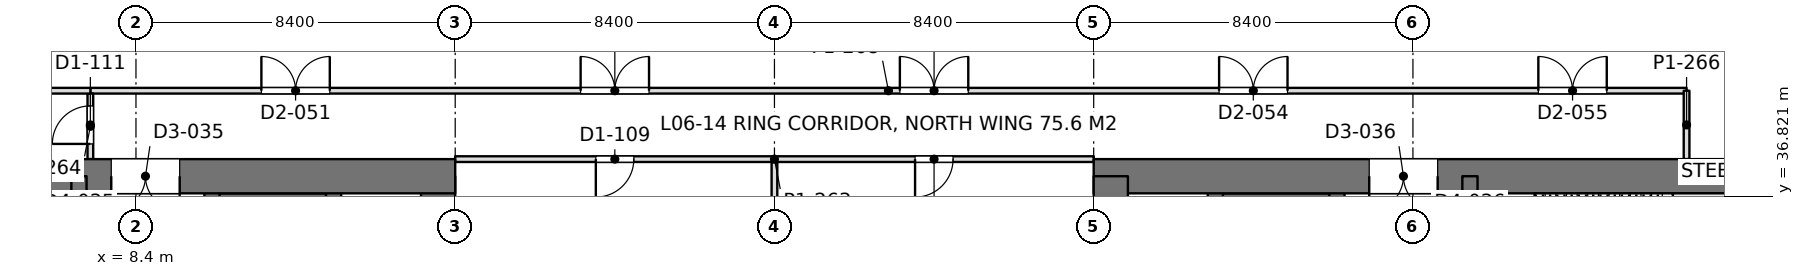
"""IFC4 building model, lengths in metres.
Left out: names, types, materials, properties, quantities, classifications, styles, units other than length and angle.
Written with IfcOpenShell. Run it as: python <this file> out.ifc"""

import sys

from ifc_helpers import new_model, si_unit, direction, frame, frame_2d, origin, place, context, subcontext, project, spatial, rectangle, extrude, element, fill, save


model = new_model("IFC4")
c1 = context("Model", 3, precision=1e-05, world=origin(), true_north=direction((0.0, 1.0)))
c2 = subcontext(c1, "Body", "Model", "MODEL_VIEW")
j1 = project(units=[si_unit("LENGTHUNIT", "METRE"), si_unit("PLANEANGLEUNIT", "RADIAN")], contexts=[c1])
p1 = place(None, origin())
s1 = spatial("IfcSite", under=j1, at=p1, CompositionType="ELEMENT")
p2 = place(p1, origin())
s2 = spatial("IfcBuilding", under=s1, at=p2, CompositionType="ELEMENT")
p3 = place(p2, frame((0.0, 0.0, 27.9)))
s3 = spatial("IfcBuildingStorey", under=s2, at=p3, CompositionType="ELEMENT", Elevation=27.9)
p4 = place(p3, frame((-1.2, 37.35, 0.0), z_axis=(0.0, 0.0, 1.0), x_axis=(1.0, 0.0, 0.0)))
e1 = element("IfcWall", 1, at=p4, inside=s3, PredefinedType="SHEAR", context=c2, shape_type="SweptSolid", body=[
    extrude(rectangle(XDim=18.0, YDim=0.9, at=frame_2d((9.0, 0.0))), origin(), (0.0, 0.0, 1.0), 4.5),
])
p5 = place(p4, frame((8.95, 0.0, 0.0)))
e2 = element("IfcOpeningElement", 2, at=p5, cuts=e1, PredefinedType="OPENING", context=c2, shape_type="SweptSolid", body=[
    extrude(rectangle(XDim=1.8, YDim=2.4, at=frame_2d((0.9, 1.2))), frame((0.0, 0.46, 0.0), z_axis=(0.0, -1.0, 0.0), x_axis=(1.0, 0.0, 0.0)), (0.0, 0.0, 1.0), 0.92),
])
p6 = place(p3, frame((16.35, 13.05, 0.0), z_axis=(0.0, 0.0, 1.0), x_axis=(0.0, 1.0, 0.0)))
e3 = element("IfcWall", 3, at=p6, inside=s3, PredefinedType="SHEAR", context=c2, shape_type="SweptSolid", body=[
    extrude(rectangle(XDim=24.3, YDim=0.9, at=frame_2d((12.15, 0.0))), origin(), (0.0, 0.0, 1.0), 4.5),
])
p7 = place(p3, frame((6.9, 13.05, 0.0), z_axis=(0.0, 0.0, 1.0), x_axis=(0.0, 1.0, 0.0)))
e4 = element("IfcWall", 4, at=p7, inside=s3, PredefinedType="SHEAR", context=c2, shape_type="SweptSolid", body=[
    extrude(rectangle(XDim=24.3, YDim=0.4, at=frame_2d((12.15, 0.0))), origin(), (0.0, 0.0, 1.0), 4.5),
])
p8 = place(p7, frame((1.3, 0.0, 0.0)))
e5 = element("IfcOpeningElement", 5, at=p8, cuts=e4, PredefinedType="OPENING", context=c2, shape_type="SweptSolid", body=[
    extrude(rectangle(XDim=1.0, YDim=2.2, at=frame_2d((0.5, 1.1))), frame((0.0, 0.21, 0.0), z_axis=(0.0, -1.0, 0.0), x_axis=(1.0, 0.0, 0.0)), (0.0, 0.0, 1.0), 0.42),
])
p9 = place(p7, frame((22.0, 0.0, 0.0)))
e6 = element("IfcOpeningElement", 6, at=p9, cuts=e4, PredefinedType="OPENING", context=c2, shape_type="SweptSolid", body=[
    extrude(rectangle(XDim=1.0, YDim=2.2, at=frame_2d((0.5, 1.1))), frame((0.0, 0.21, 0.0), z_axis=(0.0, -1.0, 0.0), x_axis=(1.0, 0.0, 0.0)), (0.0, 0.0, 1.0), 0.42),
])
p10 = place(p7, frame((5.55, 0.0, 0.0)))
e7 = element("IfcOpeningElement", 7, at=p10, cuts=e4, PredefinedType="OPENING", context=c2, shape_type="SweptSolid", body=[
    extrude(rectangle(XDim=1.0, YDim=2.2, at=frame_2d((0.5, 1.1))), frame((0.0, 0.21, 0.0), z_axis=(0.0, -1.0, 0.0), x_axis=(1.0, 0.0, 0.0)), (0.0, 0.0, 1.0), 0.42),
])
p11 = place(p7, frame((9.55, 0.0, 0.0)))
e8 = element("IfcOpeningElement", 8, at=p11, cuts=e4, PredefinedType="OPENING", context=c2, shape_type="SweptSolid", body=[
    extrude(rectangle(XDim=1.0, YDim=2.2, at=frame_2d((0.5, 1.1))), frame((0.0, 0.21, 0.0), z_axis=(0.0, -1.0, 0.0), x_axis=(1.0, 0.0, 0.0)), (0.0, 0.0, 1.0), 0.42),
])
p12 = place(p7, frame((12.8, 0.0, 0.0)))
e9 = element("IfcOpeningElement", 9, at=p12, cuts=e4, PredefinedType="OPENING", context=c2, shape_type="SweptSolid", body=[
    extrude(rectangle(XDim=1.1, YDim=2.2, at=frame_2d((0.55, 1.1))), frame((0.0, 0.21, 0.0), z_axis=(0.0, -1.0, 0.0), x_axis=(1.0, 0.0, 0.0)), (0.0, 0.0, 1.0), 0.42),
])
p13 = place(p7, frame((15.538, 0.0, 0.0)))
e10 = element("IfcOpeningElement", 10, at=p13, cuts=e4, PredefinedType="OPENING", context=c2, shape_type="SweptSolid", body=[
    extrude(rectangle(XDim=1.1, YDim=2.2, at=frame_2d((0.55, 1.1))), frame((0.0, 0.21, 0.0), z_axis=(0.0, -1.0, 0.0), x_axis=(1.0, 0.0, 0.0)), (0.0, 0.0, 1.0), 0.42),
])
p14 = place(p7, frame((18.262, 0.0, 0.0)))
e11 = element("IfcOpeningElement", 11, at=p14, cuts=e4, PredefinedType="OPENING", context=c2, shape_type="SweptSolid", body=[
    extrude(rectangle(XDim=1.1, YDim=2.2, at=frame_2d((0.55, 1.1))), frame((0.0, 0.21, 0.0), z_axis=(0.0, -1.0, 0.0), x_axis=(1.0, 0.0, 0.0)), (0.0, 0.0, 1.0), 0.42),
])
p15 = place(p3, frame((10.4, 13.05, 0.0), z_axis=(0.0, 0.0, 1.0), x_axis=(0.0, 1.0, 0.0)))
e12 = element("IfcWall", 12, at=p15, inside=s3, PredefinedType="SHEAR", context=c2, shape_type="SweptSolid", body=[
    extrude(rectangle(XDim=24.3, YDim=0.4, at=frame_2d((12.15, 0.0))), origin(), (0.0, 0.0, 1.0), 4.5),
])
p16 = place(p15, frame((1.5, 0.0, 0.0)))
e13 = element("IfcOpeningElement", 13, at=p16, cuts=e12, PredefinedType="OPENING", context=c2, shape_type="SweptSolid", body=[
    extrude(rectangle(XDim=1.1, YDim=2.2, at=frame_2d((0.55, 1.1))), frame((0.0, 0.21, 0.0), z_axis=(0.0, -1.0, 0.0), x_axis=(1.0, 0.0, 0.0)), (0.0, 0.0, 1.0), 0.42),
])
p17 = place(p15, frame((4.35, 0.0, 0.0)))
e14 = element("IfcOpeningElement", 14, at=p17, cuts=e12, PredefinedType="OPENING", context=c2, shape_type="SweptSolid", body=[
    extrude(rectangle(XDim=1.1, YDim=2.2, at=frame_2d((0.55, 1.1))), frame((0.0, 0.21, 0.0), z_axis=(0.0, -1.0, 0.0), x_axis=(1.0, 0.0, 0.0)), (0.0, 0.0, 1.0), 0.42),
])
p18 = place(p15, frame((7.2, 0.0, 0.0)))
e15 = element("IfcOpeningElement", 15, at=p18, cuts=e12, PredefinedType="OPENING", context=c2, shape_type="SweptSolid", body=[
    extrude(rectangle(XDim=1.1, YDim=2.2, at=frame_2d((0.55, 1.1))), frame((0.0, 0.21, 0.0), z_axis=(0.0, -1.0, 0.0), x_axis=(1.0, 0.0, 0.0)), (0.0, 0.0, 1.0), 0.42),
])
p19 = place(p15, frame((21.45, 0.0, 0.0)))
e16 = element("IfcOpeningElement", 16, at=p19, cuts=e12, PredefinedType="OPENING", context=c2, shape_type="SweptSolid", body=[
    extrude(rectangle(XDim=1.1, YDim=2.2, at=frame_2d((0.55, 1.1))), frame((0.0, 0.21, 0.0), z_axis=(0.0, -1.0, 0.0), x_axis=(1.0, 0.0, 0.0)), (0.0, 0.0, 1.0), 0.42),
])
p20 = place(p3, frame((13.6, 13.05, 0.0), z_axis=(0.0, 0.0, 1.0), x_axis=(0.0, 1.0, 0.0)))
e17 = element("IfcWall", 17, at=p20, inside=s3, PredefinedType="SHEAR", context=c2, shape_type="SweptSolid", body=[
    extrude(rectangle(XDim=24.3, YDim=0.4, at=frame_2d((12.15, 0.0))), origin(), (0.0, 0.0, 1.0), 4.5),
])
p21 = place(p3, frame((10.4, 36.625, 0.0), z_axis=(0.0, 0.0, 1.0), x_axis=(1.0, 0.0, 0.0)))
e18 = element("IfcWall", 18, at=p21, inside=s3, PredefinedType="SHEAR", context=c2, shape_type="SweptSolid", body=[
    extrude(rectangle(XDim=3.2, YDim=0.55, at=frame_2d((1.6, 0.0))), origin(), (0.0, 0.0, 1.0), 4.5),
])
p22 = place(p3, frame((33.6, 37.35, 0.0), z_axis=(0.0, 0.0, 1.0), x_axis=(1.0, 0.0, 0.0)))
e19 = element("IfcWall", 19, at=p22, inside=s3, PredefinedType="SHEAR", context=c2, shape_type="SweptSolid", body=[
    extrude(rectangle(XDim=18.0, YDim=0.9, at=frame_2d((9.0, 0.0))), origin(), (0.0, 0.0, 1.0), 4.5),
])
p23 = place(p22, frame((7.25, 0.0, 0.0)))
e20 = element("IfcOpeningElement", 20, at=p23, cuts=e19, PredefinedType="OPENING", context=c2, shape_type="SweptSolid", body=[
    extrude(rectangle(XDim=1.8, YDim=2.4, at=frame_2d((0.9, 1.2))), frame((0.0, 0.46, 0.0), z_axis=(0.0, -1.0, 0.0), x_axis=(1.0, 0.0, 0.0)), (0.0, 0.0, 1.0), 0.92),
])
p24 = place(p3, frame((34.05, 13.05, 0.0), z_axis=(0.0, 0.0, 1.0), x_axis=(0.0, 1.0, 0.0)))
e21 = element("IfcWall", 21, at=p24, inside=s3, PredefinedType="SHEAR", context=c2, shape_type="SweptSolid", body=[
    extrude(rectangle(XDim=24.3, YDim=0.9, at=frame_2d((12.15, 0.0))), origin(), (0.0, 0.0, 1.0), 4.5),
])
p25 = place(p3, frame((43.5, 13.05, 0.0), z_axis=(0.0, 0.0, 1.0), x_axis=(0.0, 1.0, 0.0)))
e22 = element("IfcWall", 22, at=p25, inside=s3, PredefinedType="SHEAR", context=c2, shape_type="SweptSolid", body=[
    extrude(rectangle(XDim=24.3, YDim=0.4, at=frame_2d((12.15, 0.0))), origin(), (0.0, 0.0, 1.0), 4.5),
])
p26 = place(p25, frame((1.3, 0.0, 0.0)))
e23 = element("IfcOpeningElement", 23, at=p26, cuts=e22, PredefinedType="OPENING", context=c2, shape_type="SweptSolid", body=[
    extrude(rectangle(XDim=1.0, YDim=2.2, at=frame_2d((0.5, 1.1))), frame((0.0, 0.21, 0.0), z_axis=(0.0, -1.0, 0.0), x_axis=(1.0, 0.0, 0.0)), (0.0, 0.0, 1.0), 0.42),
])
p27 = place(p25, frame((22.0, 0.0, 0.0)))
e24 = element("IfcOpeningElement", 24, at=p27, cuts=e22, PredefinedType="OPENING", context=c2, shape_type="SweptSolid", body=[
    extrude(rectangle(XDim=1.0, YDim=2.2, at=frame_2d((0.5, 1.1))), frame((0.0, 0.21, 0.0), z_axis=(0.0, -1.0, 0.0), x_axis=(1.0, 0.0, 0.0)), (0.0, 0.0, 1.0), 0.42),
])
p28 = place(p25, frame((5.55, 0.0, 0.0)))
e25 = element("IfcOpeningElement", 25, at=p28, cuts=e22, PredefinedType="OPENING", context=c2, shape_type="SweptSolid", body=[
    extrude(rectangle(XDim=1.0, YDim=2.2, at=frame_2d((0.5, 1.1))), frame((0.0, 0.21, 0.0), z_axis=(0.0, -1.0, 0.0), x_axis=(1.0, 0.0, 0.0)), (0.0, 0.0, 1.0), 0.42),
])
p29 = place(p25, frame((9.55, 0.0, 0.0)))
e26 = element("IfcOpeningElement", 26, at=p29, cuts=e22, PredefinedType="OPENING", context=c2, shape_type="SweptSolid", body=[
    extrude(rectangle(XDim=1.0, YDim=2.2, at=frame_2d((0.5, 1.1))), frame((0.0, 0.21, 0.0), z_axis=(0.0, -1.0, 0.0), x_axis=(1.0, 0.0, 0.0)), (0.0, 0.0, 1.0), 0.42),
])
p30 = place(p25, frame((12.8, 0.0, 0.0)))
e27 = element("IfcOpeningElement", 27, at=p30, cuts=e22, PredefinedType="OPENING", context=c2, shape_type="SweptSolid", body=[
    extrude(rectangle(XDim=1.1, YDim=2.2, at=frame_2d((0.55, 1.1))), frame((0.0, 0.21, 0.0), z_axis=(0.0, -1.0, 0.0), x_axis=(1.0, 0.0, 0.0)), (0.0, 0.0, 1.0), 0.42),
])
p31 = place(p25, frame((15.538, 0.0, 0.0)))
e28 = element("IfcOpeningElement", 28, at=p31, cuts=e22, PredefinedType="OPENING", context=c2, shape_type="SweptSolid", body=[
    extrude(rectangle(XDim=1.1, YDim=2.2, at=frame_2d((0.55, 1.1))), frame((0.0, 0.21, 0.0), z_axis=(0.0, -1.0, 0.0), x_axis=(1.0, 0.0, 0.0)), (0.0, 0.0, 1.0), 0.42),
])
p32 = place(p25, frame((18.262, 0.0, 0.0)))
e29 = element("IfcOpeningElement", 29, at=p32, cuts=e22, PredefinedType="OPENING", context=c2, shape_type="SweptSolid", body=[
    extrude(rectangle(XDim=1.1, YDim=2.2, at=frame_2d((0.55, 1.1))), frame((0.0, 0.21, 0.0), z_axis=(0.0, -1.0, 0.0), x_axis=(1.0, 0.0, 0.0)), (0.0, 0.0, 1.0), 0.42),
])
p33 = place(p3, frame((40.0, 13.05, 0.0), z_axis=(0.0, 0.0, 1.0), x_axis=(0.0, 1.0, 0.0)))
e30 = element("IfcWall", 30, at=p33, inside=s3, PredefinedType="SHEAR", context=c2, shape_type="SweptSolid", body=[
    extrude(rectangle(XDim=24.3, YDim=0.4, at=frame_2d((12.15, 0.0))), origin(), (0.0, 0.0, 1.0), 4.5),
])
p34 = place(p33, frame((1.5, 0.0, 0.0)))
e31 = element("IfcOpeningElement", 31, at=p34, cuts=e30, PredefinedType="OPENING", context=c2, shape_type="SweptSolid", body=[
    extrude(rectangle(XDim=1.1, YDim=2.2, at=frame_2d((0.55, 1.1))), frame((0.0, 0.21, 0.0), z_axis=(0.0, -1.0, 0.0), x_axis=(1.0, 0.0, 0.0)), (0.0, 0.0, 1.0), 0.42),
])
p35 = place(p33, frame((4.35, 0.0, 0.0)))
e32 = element("IfcOpeningElement", 32, at=p35, cuts=e30, PredefinedType="OPENING", context=c2, shape_type="SweptSolid", body=[
    extrude(rectangle(XDim=1.1, YDim=2.2, at=frame_2d((0.55, 1.1))), frame((0.0, 0.21, 0.0), z_axis=(0.0, -1.0, 0.0), x_axis=(1.0, 0.0, 0.0)), (0.0, 0.0, 1.0), 0.42),
])
p36 = place(p33, frame((7.2, 0.0, 0.0)))
e33 = element("IfcOpeningElement", 33, at=p36, cuts=e30, PredefinedType="OPENING", context=c2, shape_type="SweptSolid", body=[
    extrude(rectangle(XDim=1.1, YDim=2.2, at=frame_2d((0.55, 1.1))), frame((0.0, 0.21, 0.0), z_axis=(0.0, -1.0, 0.0), x_axis=(1.0, 0.0, 0.0)), (0.0, 0.0, 1.0), 0.42),
])
p37 = place(p33, frame((21.45, 0.0, 0.0)))
e34 = element("IfcOpeningElement", 34, at=p37, cuts=e30, PredefinedType="OPENING", context=c2, shape_type="SweptSolid", body=[
    extrude(rectangle(XDim=1.1, YDim=2.2, at=frame_2d((0.55, 1.1))), frame((0.0, 0.21, 0.0), z_axis=(0.0, -1.0, 0.0), x_axis=(1.0, 0.0, 0.0)), (0.0, 0.0, 1.0), 0.42),
])
p38 = place(p3, frame((36.8, 13.05, 0.0), z_axis=(0.0, 0.0, 1.0), x_axis=(0.0, 1.0, 0.0)))
e35 = element("IfcWall", 35, at=p38, inside=s3, PredefinedType="SHEAR", context=c2, shape_type="SweptSolid", body=[
    extrude(rectangle(XDim=24.3, YDim=0.4, at=frame_2d((12.15, 0.0))), origin(), (0.0, 0.0, 1.0), 4.5),
])
p39 = place(p3, frame((40.0, 36.625, 0.0), z_axis=(0.0, 0.0, 1.0), x_axis=(-1.0, 0.0, 0.0)))
e36 = element("IfcWall", 36, at=p39, inside=s3, PredefinedType="SHEAR", context=c2, shape_type="SweptSolid", body=[
    extrude(rectangle(XDim=3.2, YDim=0.55, at=frame_2d((1.6, 0.0))), origin(), (0.0, 0.0, 1.0), 4.5),
])
p40 = place(p3, frame((7.198, 39.6, 0.0), z_axis=(0.0, 0.0, 1.0), x_axis=(1.0, 0.0, 0.0)))
e37 = element("IfcWall", 37, at=p40, inside=s3, PredefinedType="PARTITIONING", context=c2, shape_type="SweptSolid", body=[
    extrude(rectangle(XDim=42.002, YDim=0.15, at=frame_2d((21.001, 0.0))), origin(), (0.0, 0.0, 1.0), 3.74),
])
p41 = place(p40, frame((4.502, 0.0, 0.0)))
e38 = element("IfcOpeningElement", 38, at=p41, cuts=e37, PredefinedType="OPENING", context=c2, shape_type="SweptSolid", body=[
    extrude(rectangle(XDim=1.8, YDim=2.2, at=frame_2d((0.9, 1.1))), frame((0.0, 0.085, 0.0), z_axis=(0.0, -1.0, 0.0), x_axis=(1.0, 0.0, 0.0)), (0.0, 0.0, 1.0), 0.17),
])
p42 = place(p40, frame((12.902, 0.0, 0.0)))
e39 = element("IfcOpeningElement", 39, at=p42, cuts=e37, PredefinedType="OPENING", context=c2, shape_type="SweptSolid", body=[
    extrude(rectangle(XDim=1.8, YDim=2.2, at=frame_2d((0.9, 1.1))), frame((0.0, 0.085, 0.0), z_axis=(0.0, -1.0, 0.0), x_axis=(1.0, 0.0, 0.0)), (0.0, 0.0, 1.0), 0.17),
])
p43 = place(p40, frame((21.302, 0.0, 0.0)))
e40 = element("IfcOpeningElement", 40, at=p43, cuts=e37, PredefinedType="OPENING", context=c2, shape_type="SweptSolid", body=[
    extrude(rectangle(XDim=1.8, YDim=2.2, at=frame_2d((0.9, 1.1))), frame((0.0, 0.085, 0.0), z_axis=(0.0, -1.0, 0.0), x_axis=(1.0, 0.0, 0.0)), (0.0, 0.0, 1.0), 0.17),
])
p44 = place(p40, frame((29.702, 0.0, 0.0)))
e41 = element("IfcOpeningElement", 41, at=p44, cuts=e37, PredefinedType="OPENING", context=c2, shape_type="SweptSolid", body=[
    extrude(rectangle(XDim=1.8, YDim=2.2, at=frame_2d((0.9, 1.1))), frame((0.0, 0.085, 0.0), z_axis=(0.0, -1.0, 0.0), x_axis=(1.0, 0.0, 0.0)), (0.0, 0.0, 1.0), 0.17),
])
p45 = place(p40, frame((38.102, 0.0, 0.0)))
e42 = element("IfcOpeningElement", 42, at=p45, cuts=e37, PredefinedType="OPENING", context=c2, shape_type="SweptSolid", body=[
    extrude(rectangle(XDim=1.8, YDim=2.2, at=frame_2d((0.9, 1.1))), frame((0.0, 0.085, 0.0), z_axis=(0.0, -1.0, 0.0), x_axis=(1.0, 0.0, 0.0)), (0.0, 0.0, 1.0), 0.17),
])
p46 = place(p3, frame((7.2, 37.8, 0.0), z_axis=(0.0, 0.0, 1.0), x_axis=(0.0, 1.0, 0.0)))
e43 = element("IfcWall", 43, at=p46, inside=s3, PredefinedType="PARTITIONING", context=c2, shape_type="SweptSolid", body=[
    extrude(rectangle(XDim=1.726, YDim=0.15, at=frame_2d((0.863, 0.0))), origin(), (0.0, 0.0, 1.0), 4.34),
])
p47 = place(p46, frame((0.4, 0.0, 0.0)))
e44 = element("IfcOpeningElement", 44, at=p47, cuts=e43, PredefinedType="OPENING", context=c2, shape_type="SweptSolid", body=[
    extrude(rectangle(XDim=1.0, YDim=2.2, at=frame_2d((0.5, 1.1))), frame((0.0, 0.085, 0.0), z_axis=(0.0, -1.0, 0.0), x_axis=(1.0, 0.0, 0.0)), (0.0, 0.0, 1.0), 0.17),
])
p48 = place(p3, frame((49.2, 37.8, 0.0), z_axis=(0.0, 0.0, 1.0), x_axis=(0.0, 1.0, 0.0)))
e45 = element("IfcWall", 45, at=p48, inside=s3, PredefinedType="PARTITIONING", context=c2, shape_type="SweptSolid", body=[
    extrude(rectangle(XDim=1.8, YDim=0.15, at=frame_2d((0.9, 0.0))), origin(), (0.0, 0.0, 1.0), 4.34),
])
p49 = place(p3, frame((1.2, 39.6, 0.0), z_axis=(0.0, 0.0, 1.0), x_axis=(1.0, 0.0, 0.0)))
e46 = element("IfcWall", 46, at=p49, inside=s3, PredefinedType="PARTITIONING", context=c2, shape_type="SweptSolid", body=[
    extrude(rectangle(XDim=6.002, YDim=0.15, at=frame_2d((3.001, 0.0))), origin(), (0.0, 0.0, 1.0), 3.98),
])
p50 = place(p3, frame((25.2, 34.199, 0.0), z_axis=(0.0, 0.0, 1.0), x_axis=(0.0, 1.0, 0.0)))
e47 = element("IfcWall", 47, at=p50, inside=s3, PredefinedType="PARTITIONING", context=c2, shape_type="SweptSolid", body=[
    extrude(rectangle(XDim=3.527, YDim=0.15, at=frame_2d((1.764, 0.0))), origin(), (0.0, 0.0, 1.0), 3.74),
])
p51 = place(p3, frame((16.798, 37.8, 0.0), z_axis=(0.0, 0.0, 1.0), x_axis=(1.0, 0.0, 0.0)))
e48 = element("IfcWall", 48, at=p51, inside=s3, PredefinedType="PARTITIONING", context=c2, shape_type="SweptSolid", body=[
    extrude(rectangle(XDim=16.804, YDim=0.15, at=frame_2d((8.402, 0.0))), origin(), (0.0, 0.0, 1.0), 3.74),
])
p52 = place(p51, frame((3.702, 0.0, 0.0)))
e49 = element("IfcOpeningElement", 49, at=p52, cuts=e48, PredefinedType="OPENING", context=c2, shape_type="SweptSolid", body=[
    extrude(rectangle(XDim=1.0, YDim=2.2, at=frame_2d((0.5, 1.1))), frame((0.0, 0.085, 0.0), z_axis=(0.0, -1.0, 0.0), x_axis=(1.0, 0.0, 0.0)), (0.0, 0.0, 1.0), 0.17),
])
p53 = place(p51, frame((12.102, 0.0, 0.0)))
e50 = element("IfcOpeningElement", 50, at=p53, cuts=e48, PredefinedType="OPENING", context=c2, shape_type="SweptSolid", body=[
    extrude(rectangle(XDim=1.0, YDim=2.2, at=frame_2d((0.5, 1.1))), frame((0.0, 0.085, 0.0), z_axis=(0.0, -1.0, 0.0), x_axis=(1.0, 0.0, 0.0)), (0.0, 0.0, 1.0), 0.17),
])
p54 = place(p5, frame((1.8, 0.0, 0.0), z_axis=(0.0, 0.0, 1.0), x_axis=(-1.0, 0.0, 0.0)))
e51 = element("IfcDoor", 51, at=p54, inside=s3, OperationType="DOUBLE_DOOR_SINGLE_SWING", PredefinedType="DOOR", context=c2, shape_type="SweptSolid", body=[
    extrude(rectangle(XDim=1.8, YDim=2.4, at=frame_2d((0.9, 1.2))), frame((0.0, 0.025, 0.0), z_axis=(0.0, -1.0, 0.0), x_axis=(1.0, 0.0, 0.0)), (0.0, 0.0, 1.0), 0.05),
])
fill(e2, e51)
p55 = place(p23, frame((1.8, 0.0, 0.0), z_axis=(0.0, 0.0, 1.0), x_axis=(-1.0, 0.0, 0.0)))
e52 = element("IfcDoor", 52, at=p55, inside=s3, OperationType="DOUBLE_DOOR_SINGLE_SWING", PredefinedType="DOOR", context=c2, shape_type="SweptSolid", body=[
    extrude(rectangle(XDim=1.8, YDim=2.4, at=frame_2d((0.9, 1.2))), frame((0.0, 0.025, 0.0), z_axis=(0.0, -1.0, 0.0), x_axis=(1.0, 0.0, 0.0)), (0.0, 0.0, 1.0), 0.05),
])
fill(e20, e52)
p56 = place(p41, origin())
e53 = element("IfcDoor", 53, at=p56, inside=s3, OperationType="DOUBLE_DOOR_SINGLE_SWING", PredefinedType="DOOR", context=c2, shape_type="SweptSolid", body=[
    extrude(rectangle(XDim=1.8, YDim=2.2, at=frame_2d((0.9, 1.1))), frame((0.0, 0.025, 0.0), z_axis=(0.0, -1.0, 0.0), x_axis=(1.0, 0.0, 0.0)), (0.0, 0.0, 1.0), 0.05),
])
fill(e38, e53)
p57 = place(p42, origin())
e54 = element("IfcDoor", 54, at=p57, inside=s3, OperationType="DOUBLE_DOOR_SINGLE_SWING", PredefinedType="DOOR", context=c2, shape_type="SweptSolid", body=[
    extrude(rectangle(XDim=1.8, YDim=2.2, at=frame_2d((0.9, 1.1))), frame((0.0, 0.025, 0.0), z_axis=(0.0, -1.0, 0.0), x_axis=(1.0, 0.0, 0.0)), (0.0, 0.0, 1.0), 0.05),
])
fill(e39, e54)
p58 = place(p43, origin())
e55 = element("IfcDoor", 55, at=p58, inside=s3, OperationType="DOUBLE_DOOR_SINGLE_SWING", PredefinedType="DOOR", context=c2, shape_type="SweptSolid", body=[
    extrude(rectangle(XDim=1.8, YDim=2.2, at=frame_2d((0.9, 1.1))), frame((0.0, 0.025, 0.0), z_axis=(0.0, -1.0, 0.0), x_axis=(1.0, 0.0, 0.0)), (0.0, 0.0, 1.0), 0.05),
])
fill(e40, e55)
p59 = place(p44, origin())
e56 = element("IfcDoor", 56, at=p59, inside=s3, OperationType="DOUBLE_DOOR_SINGLE_SWING", PredefinedType="DOOR", context=c2, shape_type="SweptSolid", body=[
    extrude(rectangle(XDim=1.8, YDim=2.2, at=frame_2d((0.9, 1.1))), frame((0.0, 0.025, 0.0), z_axis=(0.0, -1.0, 0.0), x_axis=(1.0, 0.0, 0.0)), (0.0, 0.0, 1.0), 0.05),
])
fill(e41, e56)
p60 = place(p45, origin())
e57 = element("IfcDoor", 57, at=p60, inside=s3, OperationType="DOUBLE_DOOR_SINGLE_SWING", PredefinedType="DOOR", context=c2, shape_type="SweptSolid", body=[
    extrude(rectangle(XDim=1.8, YDim=2.2, at=frame_2d((0.9, 1.1))), frame((0.0, 0.025, 0.0), z_axis=(0.0, -1.0, 0.0), x_axis=(1.0, 0.0, 0.0)), (0.0, 0.0, 1.0), 0.05),
])
fill(e42, e57)
p61 = place(p47, origin())
e58 = element("IfcDoor", 58, at=p61, inside=s3, OperationType="SINGLE_SWING_LEFT", PredefinedType="DOOR", context=c2, shape_type="SweptSolid", body=[
    extrude(rectangle(XDim=1.0, YDim=2.2, at=frame_2d((0.5, 1.1))), frame((0.0, 0.025, 0.0), z_axis=(0.0, -1.0, 0.0), x_axis=(1.0, 0.0, 0.0)), (0.0, 0.0, 1.0), 0.05),
])
fill(e44, e58)
p62 = place(p52, frame((1.0, 0.0, 0.0), z_axis=(0.0, 0.0, 1.0), x_axis=(-1.0, 0.0, 0.0)))
e59 = element("IfcDoor", 59, at=p62, inside=s3, OperationType="SINGLE_SWING_RIGHT", PredefinedType="DOOR", context=c2, shape_type="SweptSolid", body=[
    extrude(rectangle(XDim=1.0, YDim=2.2, at=frame_2d((0.5, 1.1))), frame((0.0, 0.025, 0.0), z_axis=(0.0, -1.0, 0.0), x_axis=(1.0, 0.0, 0.0)), (0.0, 0.0, 1.0), 0.05),
])
fill(e49, e59)
p63 = place(p53, frame((1.0, 0.0, 0.0), z_axis=(0.0, 0.0, 1.0), x_axis=(-1.0, 0.0, 0.0)))
e60 = element("IfcDoor", 60, at=p63, inside=s3, OperationType="SINGLE_SWING_RIGHT", PredefinedType="DOOR", context=c2, shape_type="SweptSolid", body=[
    extrude(rectangle(XDim=1.0, YDim=2.2, at=frame_2d((0.5, 1.1))), frame((0.0, 0.025, 0.0), z_axis=(0.0, -1.0, 0.0), x_axis=(1.0, 0.0, 0.0)), (0.0, 0.0, 1.0), 0.05),
])
fill(e50, e60)
save(model, sys.argv[1])
